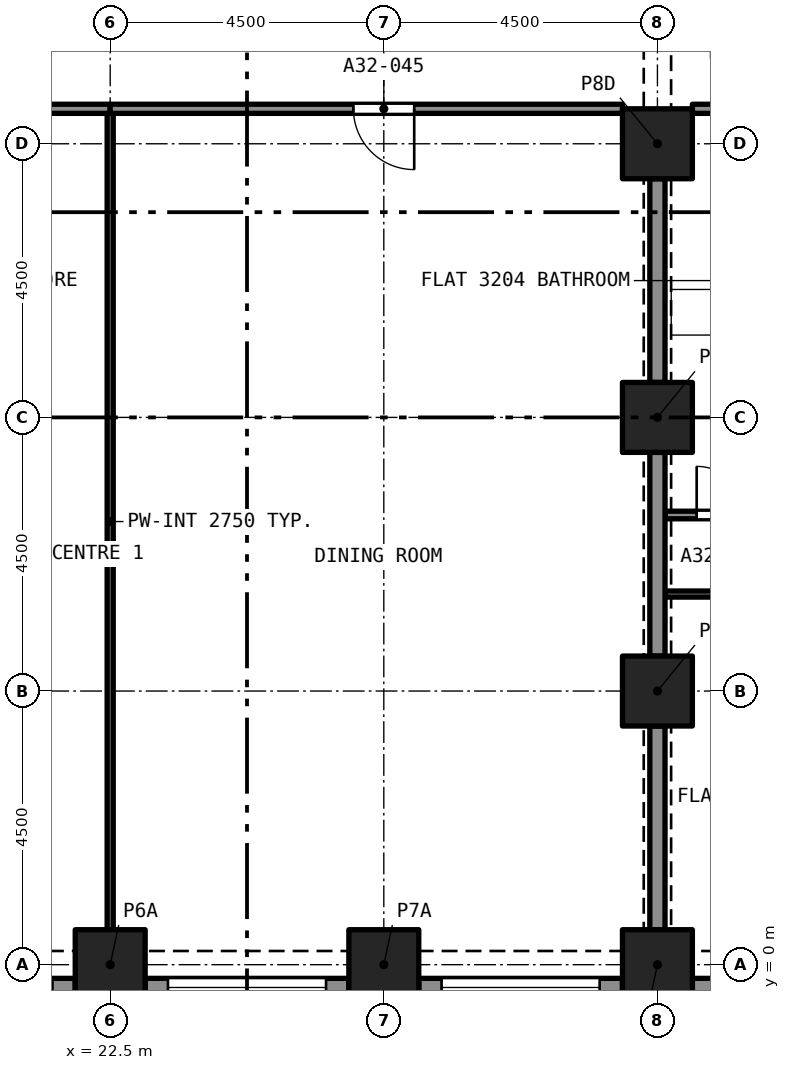
"""IFC4 building model, lengths in metres.
Left out: names, types, materials, properties, quantities, classifications, styles, units other than length and angle.
Written with IfcOpenShell. Run it as: python <this file> out.ifc"""

import sys

from ifc_helpers import new_model, si_unit, direction, frame, frame_2d, origin, origin_2d, place, context, subcontext, project, spatial, rectangle, extrude, element, fill, save


model = new_model("IFC4")
c1 = context("Model", 3, precision=1e-05, world=origin(), true_north=direction((0.0, 1.0)))
c2 = subcontext(c1, "Body", "Model", "MODEL_VIEW")
j1 = project(units=[si_unit("LENGTHUNIT", "METRE"), si_unit("PLANEANGLEUNIT", "RADIAN")], contexts=[c1])
p1 = place(None, origin())
s1 = spatial("IfcSite", under=j1, at=p1, CompositionType="ELEMENT")
p2 = place(p1, origin())
s2 = spatial("IfcBuilding", under=s1, at=p2, CompositionType="ELEMENT")
p3 = place(p2, frame((0.0, 0.0, 115.2)))
s3 = spatial("IfcBuildingStorey", under=s2, at=p3, CompositionType="ELEMENT", Elevation=115.2)
for number, where, z_axis, x_axis in (
    (1, (22.5, 0.0, 0.0), (0.0, 0.0, 1.0), (1.0, 0.0, 0.0)),
    (2, (27.0, 0.0, 0.0), (0.0, 0.0, 1.0), (1.0, 0.0, 0.0)),
    (3, (31.5, 0.0, 0.0), (0.0, 0.0, 1.0), (1.0, 0.0, 0.0)),
    (4, (31.5, 4.5, 0.0), (0.0, 0.0, 1.0), (1.0, 0.0, 0.0)),
    (5, (31.5, 9.0, 0.0), (0.0, 0.0, 1.0), (1.0, 0.0, 0.0)),
    (6, (31.5, 13.5, 0.0), (0.0, 0.0, 1.0), (1.0, 0.0, 0.0)),
):
    element("IfcColumn", number, at=place(p3, frame(where, z_axis=z_axis, x_axis=x_axis)), inside=s3, PredefinedType="COLUMN", context=c2, shape_type="SweptSolid", body=[
        extrude(rectangle(XDim=1.15, YDim=1.15, at=origin_2d()), origin(), (0.0, 0.0, 1.0), 3.2),
    ])
p4 = place(p3, frame((21.925, -0.375, 0.0), z_axis=(0.0, 0.0, 1.0), x_axis=(-1.0, 0.0, 0.0)))
e7 = element("IfcWall", 7, at=p4, inside=s3, PredefinedType="SOLIDWALL", context=c2, shape_type="SweptSolid", body=[
    extrude(rectangle(XDim=3.35, YDim=0.3, at=frame_2d((1.675, 0.0))), origin(), (0.0, 0.0, 1.0), 3.2),
])
p5 = place(p4, frame((0.375, 0.0, 0.45)))
e8 = element("IfcOpeningElement", 8, at=p5, cuts=e7, PredefinedType="OPENING", context=c2, shape_type="SweptSolid", body=[
    extrude(rectangle(XDim=2.6, YDim=1.95, at=frame_2d((1.3, 0.975))), frame((0.0, 0.16, 0.0), z_axis=(0.0, -1.0, 0.0), x_axis=(1.0, 0.0, 0.0)), (0.0, 0.0, 1.0), 0.32),
])
p6 = place(p3, frame((26.425, -0.375, 0.0), z_axis=(0.0, 0.0, 1.0), x_axis=(-1.0, 0.0, 0.0)))
e9 = element("IfcWall", 9, at=p6, inside=s3, PredefinedType="SOLIDWALL", context=c2, shape_type="SweptSolid", body=[
    extrude(rectangle(XDim=3.35, YDim=0.3, at=frame_2d((1.675, 0.0))), origin(), (0.0, 0.0, 1.0), 3.2),
])
p7 = place(p6, frame((0.375, 0.0, 0.45)))
e10 = element("IfcOpeningElement", 10, at=p7, cuts=e9, PredefinedType="OPENING", context=c2, shape_type="SweptSolid", body=[
    extrude(rectangle(XDim=2.6, YDim=1.95, at=frame_2d((1.3, 0.975))), frame((0.0, 0.16, 0.0), z_axis=(0.0, -1.0, 0.0), x_axis=(1.0, 0.0, 0.0)), (0.0, 0.0, 1.0), 0.32),
])
p8 = place(p3, frame((30.925, -0.375, 0.0), z_axis=(0.0, 0.0, 1.0), x_axis=(-1.0, 0.0, 0.0)))
e11 = element("IfcWall", 11, at=p8, inside=s3, PredefinedType="SOLIDWALL", context=c2, shape_type="SweptSolid", body=[
    extrude(rectangle(XDim=3.35, YDim=0.3, at=frame_2d((1.675, 0.0))), origin(), (0.0, 0.0, 1.0), 3.2),
])
p9 = place(p8, frame((0.375, 0.0, 0.45)))
e12 = element("IfcOpeningElement", 12, at=p9, cuts=e11, PredefinedType="OPENING", context=c2, shape_type="SweptSolid", body=[
    extrude(rectangle(XDim=2.6, YDim=1.95, at=frame_2d((1.3, 0.975))), frame((0.0, 0.16, 0.0), z_axis=(0.0, -1.0, 0.0), x_axis=(1.0, 0.0, 0.0)), (0.0, 0.0, 1.0), 0.32),
])
p10 = place(p3, frame((35.425, -0.375, 0.0), z_axis=(0.0, 0.0, 1.0), x_axis=(-1.0, 0.0, 0.0)))
e13 = element("IfcWall", 13, at=p10, inside=s3, PredefinedType="SOLIDWALL", context=c2, shape_type="SweptSolid", body=[
    extrude(rectangle(XDim=3.35, YDim=0.3, at=frame_2d((1.675, 0.0))), origin(), (0.0, 0.0, 1.0), 3.2),
])
p11 = place(p10, frame((0.375, 0.0, 0.45)))
e14 = element("IfcOpeningElement", 14, at=p11, cuts=e13, PredefinedType="OPENING", context=c2, shape_type="SweptSolid", body=[
    extrude(rectangle(XDim=2.6, YDim=1.95, at=frame_2d((1.3, 0.975))), frame((0.0, 0.16, 0.0), z_axis=(0.0, -1.0, 0.0), x_axis=(1.0, 0.0, 0.0)), (0.0, 0.0, 1.0), 0.32),
])
p12 = place(p3, frame((31.625, 7.395, 0.0), z_axis=(0.0, 0.0, 1.0), x_axis=(1.0, 0.0, 0.0)))
e15 = element("IfcWall", 15, at=p12, inside=s3, PredefinedType="PARTITIONING", context=c2, shape_type="SweptSolid", body=[
    extrude(rectangle(XDim=1.966, YDim=0.125, at=frame_2d((0.983, 0.0))), origin(), (0.0, 0.0, 1.0), 2.9),
])
p13 = place(p12, frame((0.521, 0.0, 0.0)))
e16 = element("IfcOpeningElement", 16, at=p13, cuts=e15, PredefinedType="OPENING", context=c2, shape_type="SweptSolid", body=[
    extrude(rectangle(XDim=0.8, YDim=2.1, at=frame_2d((0.4, 1.05))), frame((0.0, 0.073, 0.0), z_axis=(0.0, -1.0, 0.0), x_axis=(1.0, 0.0, 0.0)), (0.0, 0.0, 1.0), 0.145),
])
p14 = place(p3, frame((31.5, 9.575, 0.0), z_axis=(0.0, 0.0, 1.0), x_axis=(0.0, 1.0, 0.0)))
e17 = element("IfcWall", 17, at=p14, inside=s3, PredefinedType="PARTITIONING", context=c2, shape_type="SweptSolid", body=[
    extrude(rectangle(XDim=3.35, YDim=0.25, at=frame_2d((1.675, 0.0))), origin(), (0.0, 0.0, 1.0), 2.38),
])
p15 = place(p3, frame((32.075, 14.075, 0.0), z_axis=(0.0, 0.0, 1.0), x_axis=(1.0, 0.0, 0.0)))
e18 = element("IfcWall", 18, at=p15, inside=s3, PredefinedType="PARTITIONING", context=c2, shape_type="SweptSolid", body=[
    extrude(rectangle(XDim=3.175, YDim=0.15, at=frame_2d((1.587, 0.0))), origin(), (0.0, 0.0, 1.0), 2.9),
])
p16 = place(p3, frame((36.0, 6.095, 0.0), z_axis=(0.0, 0.0, 1.0), x_axis=(-1.0, 0.0, 0.0)))
e19 = element("IfcWall", 19, at=p16, inside=s3, PredefinedType="PARTITIONING", context=c2, shape_type="SweptSolid", body=[
    extrude(rectangle(XDim=4.375, YDim=0.1, at=frame_2d((2.188, 0.0))), origin(), (0.0, 0.0, 1.0), 2.9),
])
p17 = place(p16, frame((1.75, 0.0, 0.0)))
e20 = element("IfcOpeningElement", 20, at=p17, cuts=e19, PredefinedType="OPENING", context=c2, shape_type="SweptSolid", body=[
    extrude(rectangle(XDim=1.0, YDim=2.1, at=frame_2d((0.5, 1.05))), frame((0.0, 0.06, 0.0), z_axis=(0.0, -1.0, 0.0), x_axis=(1.0, 0.0, 0.0)), (0.0, 0.0, 1.0), 0.12),
])
for number, where, z_axis, x_axis in (
    (21, (31.5, 0.575, 0.0), (0.0, 0.0, 1.0), (0.0, 1.0, 0.0)),
    (22, (31.5, 5.075, 0.0), (0.0, 0.0, 1.0), (0.0, 1.0, 0.0)),
):
    element("IfcWall", number, at=place(p3, frame(where, z_axis=z_axis, x_axis=x_axis)), inside=s3, PredefinedType="PARTITIONING", context=c2, shape_type="SweptSolid", body=[
        extrude(rectangle(XDim=3.35, YDim=0.25, at=frame_2d((1.675, 0.0))), origin(), (0.0, 0.0, 1.0), 2.38),
    ])
p18 = place(p3, frame((22.5, 0.575, 0.0), z_axis=(0.0, 0.0, 1.0), x_axis=(0.0, 1.0, 0.0)))
e23 = element("IfcWall", 23, at=p18, inside=s3, PredefinedType="PARTITIONING", context=c2, shape_type="SweptSolid", body=[
    extrude(rectangle(XDim=13.425, YDim=0.1, at=frame_2d((6.712, 0.0))), origin(), (0.0, 0.0, 1.0), 2.75),
])
p19 = place(p3, frame((22.5, 14.075, 0.0), z_axis=(0.0, 0.0, 1.0), x_axis=(-1.0, 0.0, 0.0)))
e24 = element("IfcWall", 24, at=p19, inside=s3, PredefinedType="PARTITIONING", context=c2, shape_type="SweptSolid", body=[
    extrude(rectangle(XDim=3.925, YDim=0.15, at=frame_2d((1.962, 0.0))), origin(), (0.0, 0.0, 1.0), 2.75),
])
p20 = place(p19, frame((1.75, 0.0, 0.0)))
e25 = element("IfcOpeningElement", 25, at=p20, cuts=e24, PredefinedType="OPENING", context=c2, shape_type="SweptSolid", body=[
    extrude(rectangle(XDim=1.0, YDim=2.1, at=frame_2d((0.5, 1.05))), frame((0.0, 0.085, 0.0), z_axis=(0.0, -1.0, 0.0), x_axis=(1.0, 0.0, 0.0)), (0.0, 0.0, 1.0), 0.17),
])
p21 = place(p3, frame((30.925, 14.075, 0.0), z_axis=(0.0, 0.0, 1.0), x_axis=(-1.0, 0.0, 0.0)))
e26 = element("IfcWall", 26, at=p21, inside=s3, PredefinedType="PARTITIONING", context=c2, shape_type="SweptSolid", body=[
    extrude(rectangle(XDim=8.425, YDim=0.15, at=frame_2d((4.212, 0.0))), origin(), (0.0, 0.0, 1.0), 2.75),
])
p22 = place(p21, frame((3.425, 0.0, 0.0)))
e27 = element("IfcOpeningElement", 27, at=p22, cuts=e26, PredefinedType="OPENING", context=c2, shape_type="SweptSolid", body=[
    extrude(rectangle(XDim=1.0, YDim=2.1, at=frame_2d((0.5, 1.05))), frame((0.0, 0.085, 0.0), z_axis=(0.0, -1.0, 0.0), x_axis=(1.0, 0.0, 0.0)), (0.0, 0.0, 1.0), 0.17),
])
p23 = place(p7, origin())
e28 = element("IfcWindow", 28, at=p23, inside=s3, PartitioningType="SINGLE_PANEL", PredefinedType="WINDOW", context=c2, shape_type="SweptSolid", body=[
    extrude(rectangle(XDim=2.6, YDim=1.95, at=frame_2d((1.3, 0.975))), frame((0.0, 0.03, 0.0), z_axis=(0.0, -1.0, 0.0), x_axis=(1.0, 0.0, 0.0)), (0.0, 0.0, 1.0), 0.06),
])
fill(e10, e28)
p24 = place(p9, origin())
e29 = element("IfcWindow", 29, at=p24, inside=s3, PartitioningType="SINGLE_PANEL", PredefinedType="WINDOW", context=c2, shape_type="SweptSolid", body=[
    extrude(rectangle(XDim=2.6, YDim=1.95, at=frame_2d((1.3, 0.975))), frame((0.0, 0.03, 0.0), z_axis=(0.0, -1.0, 0.0), x_axis=(1.0, 0.0, 0.0)), (0.0, 0.0, 1.0), 0.06),
])
fill(e12, e29)
p25 = place(p13, origin())
e30 = element("IfcDoor", 30, at=p25, inside=s3, OperationType="SINGLE_SWING_LEFT", PredefinedType="DOOR", context=c2, shape_type="SweptSolid", body=[
    extrude(rectangle(XDim=0.8, YDim=2.1, at=frame_2d((0.4, 1.05))), frame((0.0, 0.025, 0.0), z_axis=(0.0, -1.0, 0.0), x_axis=(1.0, 0.0, 0.0)), (0.0, 0.0, 1.0), 0.05),
])
fill(e16, e30)
p26 = place(p22, origin())
e31 = element("IfcDoor", 31, at=p26, inside=s3, OperationType="SINGLE_SWING_LEFT", PredefinedType="DOOR", context=c2, shape_type="SweptSolid", body=[
    extrude(rectangle(XDim=1.0, YDim=2.1, at=frame_2d((0.5, 1.05))), frame((0.0, 0.025, 0.0), z_axis=(0.0, -1.0, 0.0), x_axis=(1.0, 0.0, 0.0)), (0.0, 0.0, 1.0), 0.05),
])
fill(e27, e31)
save(model, sys.argv[1])
